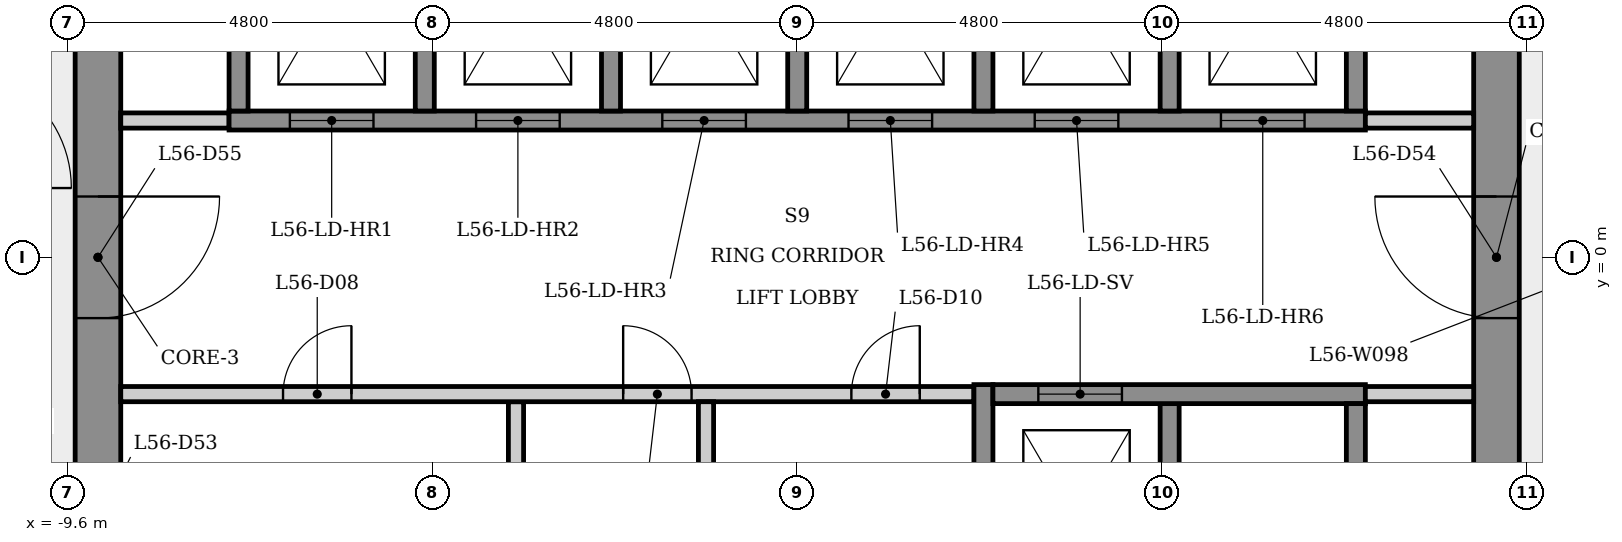
"""IFC4 building model, lengths in metres.
Left out: names, types, materials, properties, quantities, classifications, styles, units other than length and angle.
Written with IfcOpenShell. Run it as: python <this file> out.ifc"""

import sys

from ifc_helpers import new_model, si_unit, direction, frame, frame_2d, origin, place, context, subcontext, project, spatial, rectangle, extrude, element, fill, save


model = new_model("IFC4")
c1 = context("Model", 3, precision=1e-05, world=origin(), true_north=direction((0.0, 1.0)))
c2 = subcontext(c1, "Body", "Model", "MODEL_VIEW")
j1 = project(units=[si_unit("LENGTHUNIT", "METRE"), si_unit("PLANEANGLEUNIT", "RADIAN")], contexts=[c1])
p1 = place(None, origin())
s1 = spatial("IfcSite", under=j1, at=p1, CompositionType="ELEMENT")
p2 = place(p1, origin())
s2 = spatial("IfcBuilding", under=s1, at=p2, CompositionType="ELEMENT")
p3 = place(p2, frame((0.0, 0.0, 210.1)))
s3 = spatial("IfcBuildingStorey", under=s2, at=p3, CompositionType="ELEMENT", Elevation=210.1)
p4 = place(p3, frame((9.2, -5.485, 0.0), z_axis=(0.0, 0.0, 1.0), x_axis=(0.0, 1.0, 0.0)))
e1 = element("IfcWall", 1, at=p4, inside=s3, PredefinedType="SHEAR", context=c2, shape_type="SweptSolid", body=[
    extrude(rectangle(XDim=10.97, YDim=0.6, at=frame_2d((5.485, 0.0))), origin(), (0.0, 0.0, 1.0), 4.0),
])
p5 = place(p4, frame((4.685, 0.0, 0.0)))
e2 = element("IfcOpeningElement", 2, at=p5, cuts=e1, PredefinedType="OPENING", context=c2, shape_type="SweptSolid", body=[
    extrude(rectangle(XDim=1.6, YDim=2.1, at=frame_2d((0.8, 1.05))), frame((0.0, 0.31, 0.0), z_axis=(0.0, -1.0, 0.0), x_axis=(1.0, 0.0, 0.0)), (0.0, 0.0, 1.0), 0.62),
])
p6 = place(p3, frame((-9.2, 5.485, 0.0), z_axis=(0.0, 0.0, 1.0), x_axis=(0.0, -1.0, 0.0)))
e3 = element("IfcWall", 3, at=p6, inside=s3, PredefinedType="SHEAR", context=c2, shape_type="SweptSolid", body=[
    extrude(rectangle(XDim=10.97, YDim=0.6, at=frame_2d((5.485, 0.0))), origin(), (0.0, 0.0, 1.0), 4.0),
])
p7 = place(p6, frame((8.516, 0.0, 0.0)))
e4 = element("IfcOpeningElement", 4, at=p7, cuts=e3, PredefinedType="OPENING", context=c2, shape_type="SweptSolid", body=[
    extrude(rectangle(XDim=0.9, YDim=2.1, at=frame_2d((0.45, 1.05))), frame((0.0, 0.31, 0.0), z_axis=(0.0, -1.0, 0.0), x_axis=(1.0, 0.0, 0.0)), (0.0, 0.0, 1.0), 0.62),
])
p8 = place(p6, frame((4.685, 0.0, 0.0)))
e5 = element("IfcOpeningElement", 5, at=p8, cuts=e3, PredefinedType="OPENING", context=c2, shape_type="SweptSolid", body=[
    extrude(rectangle(XDim=1.6, YDim=2.1, at=frame_2d((0.8, 1.05))), frame((0.0, 0.31, 0.0), z_axis=(0.0, -1.0, 0.0), x_axis=(1.0, 0.0, 0.0)), (0.0, 0.0, 1.0), 0.62),
])
p9 = place(p3, frame((-8.9, 1.8, 0.0), z_axis=(0.0, 0.0, 1.0), x_axis=(1.0, 0.0, 0.0)))
e6 = element("IfcWall", 6, at=p9, inside=s3, PredefinedType="PARTITIONING", context=c2, shape_type="SweptSolid", body=[
    extrude(rectangle(XDim=1.425, YDim=0.2, at=frame_2d((0.712, 0.0))), origin(), (0.0, 0.0, 1.0), 3.6),
])
p10 = place(p3, frame((-7.475, 1.8, 0.0), z_axis=(0.0, 0.0, 1.0), x_axis=(1.0, 0.0, 0.0)))
e7 = element("IfcWall", 7, at=p10, inside=s3, PredefinedType="SHEAR", context=c2, shape_type="SweptSolid", body=[
    extrude(rectangle(XDim=14.95, YDim=0.25, at=frame_2d((7.475, 0.0))), origin(), (0.0, 0.0, 1.0), 3.6),
])
p11 = place(p10, frame((0.8, 0.0, 0.0)))
e8 = element("IfcOpeningElement", 8, at=p11, cuts=e7, PredefinedType="OPENING", context=c2, shape_type="SweptSolid", body=[
    extrude(rectangle(XDim=1.1, YDim=2.1, at=frame_2d((0.55, 1.05))), frame((0.0, 0.135, 0.0), z_axis=(0.0, -1.0, 0.0), x_axis=(1.0, 0.0, 0.0)), (0.0, 0.0, 1.0), 0.27),
])
p12 = place(p10, frame((3.25, 0.0, 0.0)))
e9 = element("IfcOpeningElement", 9, at=p12, cuts=e7, PredefinedType="OPENING", context=c2, shape_type="SweptSolid", body=[
    extrude(rectangle(XDim=1.1, YDim=2.1, at=frame_2d((0.55, 1.05))), frame((0.0, 0.135, 0.0), z_axis=(0.0, -1.0, 0.0), x_axis=(1.0, 0.0, 0.0)), (0.0, 0.0, 1.0), 0.27),
])
p13 = place(p10, frame((5.7, 0.0, 0.0)))
e10 = element("IfcOpeningElement", 10, at=p13, cuts=e7, PredefinedType="OPENING", context=c2, shape_type="SweptSolid", body=[
    extrude(rectangle(XDim=1.1, YDim=2.1, at=frame_2d((0.55, 1.05))), frame((0.0, 0.135, 0.0), z_axis=(0.0, -1.0, 0.0), x_axis=(1.0, 0.0, 0.0)), (0.0, 0.0, 1.0), 0.27),
])
p14 = place(p10, frame((8.15, 0.0, 0.0)))
e11 = element("IfcOpeningElement", 11, at=p14, cuts=e7, PredefinedType="OPENING", context=c2, shape_type="SweptSolid", body=[
    extrude(rectangle(XDim=1.1, YDim=2.1, at=frame_2d((0.55, 1.05))), frame((0.0, 0.135, 0.0), z_axis=(0.0, -1.0, 0.0), x_axis=(1.0, 0.0, 0.0)), (0.0, 0.0, 1.0), 0.27),
])
p15 = place(p10, frame((10.6, 0.0, 0.0)))
e12 = element("IfcOpeningElement", 12, at=p15, cuts=e7, PredefinedType="OPENING", context=c2, shape_type="SweptSolid", body=[
    extrude(rectangle(XDim=1.1, YDim=2.1, at=frame_2d((0.55, 1.05))), frame((0.0, 0.135, 0.0), z_axis=(0.0, -1.0, 0.0), x_axis=(1.0, 0.0, 0.0)), (0.0, 0.0, 1.0), 0.27),
])
p16 = place(p10, frame((13.05, 0.0, 0.0)))
e13 = element("IfcOpeningElement", 13, at=p16, cuts=e7, PredefinedType="OPENING", context=c2, shape_type="SweptSolid", body=[
    extrude(rectangle(XDim=1.1, YDim=2.1, at=frame_2d((0.55, 1.05))), frame((0.0, 0.135, 0.0), z_axis=(0.0, -1.0, 0.0), x_axis=(1.0, 0.0, 0.0)), (0.0, 0.0, 1.0), 0.27),
])
p17 = place(p3, frame((-7.35, 1.925, 0.0), z_axis=(0.0, 0.0, 1.0), x_axis=(0.0, 1.0, 0.0)))
e14 = element("IfcWall", 14, at=p17, inside=s3, PredefinedType="SHEAR", context=c2, shape_type="SweptSolid", body=[
    extrude(rectangle(XDim=4.036, YDim=0.25, at=frame_2d((2.018, 0.0))), origin(), (0.0, 0.0, 1.0), 3.6),
])
p18 = place(p3, frame((-4.9, 5.025, 0.0), z_axis=(0.0, 0.0, 1.0), x_axis=(0.0, -1.0, 0.0)))
e15 = element("IfcWall", 15, at=p18, inside=s3, PredefinedType="SHEAR", context=c2, shape_type="SweptSolid", body=[
    extrude(rectangle(XDim=3.1, YDim=0.25, at=frame_2d((1.55, 0.0))), origin(), (0.0, 0.0, 1.0), 4.0),
])
p19 = place(p3, frame((-3.7, -1.9, 0.0), z_axis=(0.0, 0.0, 1.0), x_axis=(0.0, -1.0, 0.0)))
e16 = element("IfcWall", 16, at=p19, inside=s3, PredefinedType="PARTITIONING", context=c2, shape_type="SweptSolid", body=[
    extrude(rectangle(XDim=3.15, YDim=0.2, at=frame_2d((1.575, 0.0))), origin(), (0.0, 0.0, 1.0), 3.6),
])
p20 = place(p3, frame((-8.9, -1.8, 0.0), z_axis=(0.0, 0.0, 1.0), x_axis=(1.0, 0.0, 0.0)))
e17 = element("IfcWall", 17, at=p20, inside=s3, PredefinedType="PARTITIONING", context=c2, shape_type="SweptSolid", body=[
    extrude(rectangle(XDim=11.225, YDim=0.2, at=frame_2d((5.613, 0.0))), origin(), (0.0, 0.0, 1.0), 3.6),
])
p21 = place(p20, frame((2.135, 0.0, 0.0)))
e18 = element("IfcOpeningElement", 18, at=p21, cuts=e17, PredefinedType="OPENING", context=c2, shape_type="SweptSolid", body=[
    extrude(rectangle(XDim=0.9, YDim=2.1, at=frame_2d((0.45, 1.05))), frame((0.0, 0.11, 0.0), z_axis=(0.0, -1.0, 0.0), x_axis=(1.0, 0.0, 0.0)), (0.0, 0.0, 1.0), 0.22),
])
p22 = place(p20, frame((6.61, 0.0, 0.0)))
e19 = element("IfcOpeningElement", 19, at=p22, cuts=e17, PredefinedType="OPENING", context=c2, shape_type="SweptSolid", body=[
    extrude(rectangle(XDim=0.9, YDim=2.1, at=frame_2d((0.45, 1.05))), frame((0.0, 0.11, 0.0), z_axis=(0.0, -1.0, 0.0), x_axis=(1.0, 0.0, 0.0)), (0.0, 0.0, 1.0), 0.22),
])
p23 = place(p20, frame((9.613, 0.0, 0.0)))
e20 = element("IfcOpeningElement", 20, at=p23, cuts=e17, PredefinedType="OPENING", context=c2, shape_type="SweptSolid", body=[
    extrude(rectangle(XDim=0.9, YDim=2.1, at=frame_2d((0.45, 1.05))), frame((0.0, 0.11, 0.0), z_axis=(0.0, -1.0, 0.0), x_axis=(1.0, 0.0, 0.0)), (0.0, 0.0, 1.0), 0.22),
])
p24 = place(p3, frame((-2.45, 5.025, 0.0), z_axis=(0.0, 0.0, 1.0), x_axis=(0.0, -1.0, 0.0)))
e21 = element("IfcWall", 21, at=p24, inside=s3, PredefinedType="SHEAR", context=c2, shape_type="SweptSolid", body=[
    extrude(rectangle(XDim=3.1, YDim=0.25, at=frame_2d((1.55, 0.0))), origin(), (0.0, 0.0, 1.0), 4.0),
])
p25 = place(p3, frame((-1.2, -1.9, 0.0), z_axis=(0.0, 0.0, 1.0), x_axis=(0.0, -1.0, 0.0)))
e22 = element("IfcWall", 22, at=p25, inside=s3, PredefinedType="PARTITIONING", context=c2, shape_type="SweptSolid", body=[
    extrude(rectangle(XDim=3.15, YDim=0.2, at=frame_2d((1.575, 0.0))), origin(), (0.0, 0.0, 1.0), 3.6),
])
p26 = place(p3, frame((0.0, 5.025, 0.0), z_axis=(0.0, 0.0, 1.0), x_axis=(0.0, -1.0, 0.0)))
e23 = element("IfcWall", 23, at=p26, inside=s3, PredefinedType="SHEAR", context=c2, shape_type="SweptSolid", body=[
    extrude(rectangle(XDim=3.1, YDim=0.25, at=frame_2d((1.55, 0.0))), origin(), (0.0, 0.0, 1.0), 4.0),
])
p27 = place(p3, frame((2.45, -5.275, 0.0), z_axis=(0.0, 0.0, 1.0), x_axis=(0.0, 1.0, 0.0)))
e24 = element("IfcWall", 24, at=p27, inside=s3, PredefinedType="SHEAR", context=c2, shape_type="SweptSolid", body=[
    extrude(rectangle(XDim=3.6, YDim=0.25, at=frame_2d((1.8, 0.0))), origin(), (0.0, 0.0, 1.0), 3.6),
])
for number, where, z_axis, x_axis in (
    (25, (2.45, 5.025, 0.0), (0.0, 0.0, 1.0), (0.0, -1.0, 0.0)),
    (26, (4.9, -1.925, 0.0), (0.0, 0.0, 1.0), (0.0, -1.0, 0.0)),
    (27, (4.9, 5.025, 0.0), (0.0, 0.0, 1.0), (0.0, -1.0, 0.0)),
):
    element("IfcWall", number, at=place(p3, frame(where, z_axis=z_axis, x_axis=x_axis)), inside=s3, PredefinedType="SHEAR", context=c2, shape_type="SweptSolid", body=[
        extrude(rectangle(XDim=3.1, YDim=0.25, at=frame_2d((1.55, 0.0))), origin(), (0.0, 0.0, 1.0), 4.0),
    ])
p28 = place(p3, frame((2.575, -1.8, 0.0), z_axis=(0.0, 0.0, 1.0), x_axis=(1.0, 0.0, 0.0)))
e28 = element("IfcWall", 28, at=p28, inside=s3, PredefinedType="SHEAR", context=c2, shape_type="SweptSolid", body=[
    extrude(rectangle(XDim=4.9, YDim=0.25, at=frame_2d((2.45, 0.0))), origin(), (0.0, 0.0, 1.0), 3.6),
])
p29 = place(p28, frame((0.597, 0.0, 0.0)))
e29 = element("IfcOpeningElement", 29, at=p29, cuts=e28, PredefinedType="OPENING", context=c2, shape_type="SweptSolid", body=[
    extrude(rectangle(XDim=1.1, YDim=2.1, at=frame_2d((0.55, 1.05))), frame((0.0, 0.135, 0.0), z_axis=(0.0, -1.0, 0.0), x_axis=(1.0, 0.0, 0.0)), (0.0, 0.0, 1.0), 0.27),
])
p30 = place(p3, frame((7.475, 1.8, 0.0), z_axis=(0.0, 0.0, 1.0), x_axis=(1.0, 0.0, 0.0)))
e30 = element("IfcWall", 30, at=p30, inside=s3, PredefinedType="PARTITIONING", context=c2, shape_type="SweptSolid", body=[
    extrude(rectangle(XDim=1.425, YDim=0.2, at=frame_2d((0.712, 0.0))), origin(), (0.0, 0.0, 1.0), 3.6),
])
for number, where, z_axis, x_axis in (
    (31, (7.35, -1.925, 0.0), (0.0, 0.0, 1.0), (0.0, -1.0, 0.0)),
    (32, (7.35, 5.025, 0.0), (0.0, 0.0, 1.0), (0.0, -1.0, 0.0)),
):
    element("IfcWall", number, at=place(p3, frame(where, z_axis=z_axis, x_axis=x_axis)), inside=s3, PredefinedType="SHEAR", context=c2, shape_type="SweptSolid", body=[
        extrude(rectangle(XDim=3.1, YDim=0.25, at=frame_2d((1.55, 0.0))), origin(), (0.0, 0.0, 1.0), 4.0),
    ])
p31 = place(p3, frame((8.9, -1.8, 0.0), z_axis=(0.0, 0.0, 1.0), x_axis=(-1.0, 0.0, 0.0)))
e33 = element("IfcWall", 33, at=p31, inside=s3, PredefinedType="PARTITIONING", context=c2, shape_type="SweptSolid", body=[
    extrude(rectangle(XDim=1.425, YDim=0.2, at=frame_2d((0.712, 0.0))), origin(), (0.0, 0.0, 1.0), 3.6),
])
p32 = place(p11, origin())
e34 = element("IfcDoor", 34, at=p32, inside=s3, OperationType="SLIDING_TO_LEFT", PredefinedType="DOOR", context=c2, shape_type="SweptSolid", body=[
    extrude(rectangle(XDim=1.1, YDim=2.1, at=frame_2d((0.55, 1.05))), frame((0.0, 0.025, 0.0), z_axis=(0.0, -1.0, 0.0), x_axis=(1.0, 0.0, 0.0)), (0.0, 0.0, 1.0), 0.05),
])
fill(e8, e34)
p33 = place(p12, origin())
e35 = element("IfcDoor", 35, at=p33, inside=s3, OperationType="SLIDING_TO_LEFT", PredefinedType="DOOR", context=c2, shape_type="SweptSolid", body=[
    extrude(rectangle(XDim=1.1, YDim=2.1, at=frame_2d((0.55, 1.05))), frame((0.0, 0.025, 0.0), z_axis=(0.0, -1.0, 0.0), x_axis=(1.0, 0.0, 0.0)), (0.0, 0.0, 1.0), 0.05),
])
fill(e9, e35)
p34 = place(p13, origin())
e36 = element("IfcDoor", 36, at=p34, inside=s3, OperationType="SLIDING_TO_LEFT", PredefinedType="DOOR", context=c2, shape_type="SweptSolid", body=[
    extrude(rectangle(XDim=1.1, YDim=2.1, at=frame_2d((0.55, 1.05))), frame((0.0, 0.025, 0.0), z_axis=(0.0, -1.0, 0.0), x_axis=(1.0, 0.0, 0.0)), (0.0, 0.0, 1.0), 0.05),
])
fill(e10, e36)
p35 = place(p14, origin())
e37 = element("IfcDoor", 37, at=p35, inside=s3, OperationType="SLIDING_TO_LEFT", PredefinedType="DOOR", context=c2, shape_type="SweptSolid", body=[
    extrude(rectangle(XDim=1.1, YDim=2.1, at=frame_2d((0.55, 1.05))), frame((0.0, 0.025, 0.0), z_axis=(0.0, -1.0, 0.0), x_axis=(1.0, 0.0, 0.0)), (0.0, 0.0, 1.0), 0.05),
])
fill(e11, e37)
p36 = place(p15, origin())
e38 = element("IfcDoor", 38, at=p36, inside=s3, OperationType="SLIDING_TO_LEFT", PredefinedType="DOOR", context=c2, shape_type="SweptSolid", body=[
    extrude(rectangle(XDim=1.1, YDim=2.1, at=frame_2d((0.55, 1.05))), frame((0.0, 0.025, 0.0), z_axis=(0.0, -1.0, 0.0), x_axis=(1.0, 0.0, 0.0)), (0.0, 0.0, 1.0), 0.05),
])
fill(e12, e38)
p37 = place(p16, origin())
e39 = element("IfcDoor", 39, at=p37, inside=s3, OperationType="SLIDING_TO_LEFT", PredefinedType="DOOR", context=c2, shape_type="SweptSolid", body=[
    extrude(rectangle(XDim=1.1, YDim=2.1, at=frame_2d((0.55, 1.05))), frame((0.0, 0.025, 0.0), z_axis=(0.0, -1.0, 0.0), x_axis=(1.0, 0.0, 0.0)), (0.0, 0.0, 1.0), 0.05),
])
fill(e13, e39)
p38 = place(p29, origin())
e40 = element("IfcDoor", 40, at=p38, inside=s3, OperationType="SLIDING_TO_LEFT", PredefinedType="DOOR", context=c2, shape_type="SweptSolid", body=[
    extrude(rectangle(XDim=1.1, YDim=2.1, at=frame_2d((0.55, 1.05))), frame((0.0, 0.025, 0.0), z_axis=(0.0, -1.0, 0.0), x_axis=(1.0, 0.0, 0.0)), (0.0, 0.0, 1.0), 0.05),
])
fill(e29, e40)
p39 = place(p21, origin())
e41 = element("IfcDoor", 41, at=p39, inside=s3, OperationType="SINGLE_SWING_RIGHT", PredefinedType="DOOR", context=c2, shape_type="SweptSolid", body=[
    extrude(rectangle(XDim=0.9, YDim=2.1, at=frame_2d((0.45, 1.05))), frame((0.0, 0.025, 0.0), z_axis=(0.0, -1.0, 0.0), x_axis=(1.0, 0.0, 0.0)), (0.0, 0.0, 1.0), 0.05),
])
fill(e18, e41)
p40 = place(p22, origin())
e42 = element("IfcDoor", 42, at=p40, inside=s3, OperationType="SINGLE_SWING_LEFT", PredefinedType="DOOR", context=c2, shape_type="SweptSolid", body=[
    extrude(rectangle(XDim=0.9, YDim=2.1, at=frame_2d((0.45, 1.05))), frame((0.0, 0.025, 0.0), z_axis=(0.0, -1.0, 0.0), x_axis=(1.0, 0.0, 0.0)), (0.0, 0.0, 1.0), 0.05),
])
fill(e19, e42)
p41 = place(p23, origin())
e43 = element("IfcDoor", 43, at=p41, inside=s3, OperationType="SINGLE_SWING_RIGHT", PredefinedType="DOOR", context=c2, shape_type="SweptSolid", body=[
    extrude(rectangle(XDim=0.9, YDim=2.1, at=frame_2d((0.45, 1.05))), frame((0.0, 0.025, 0.0), z_axis=(0.0, -1.0, 0.0), x_axis=(1.0, 0.0, 0.0)), (0.0, 0.0, 1.0), 0.05),
])
fill(e20, e43)
p42 = place(p5, origin())
e44 = element("IfcDoor", 44, at=p42, inside=s3, OperationType="SINGLE_SWING_RIGHT", PredefinedType="DOOR", context=c2, shape_type="SweptSolid", body=[
    extrude(rectangle(XDim=1.6, YDim=2.1, at=frame_2d((0.8, 1.05))), frame((0.0, 0.025, 0.0), z_axis=(0.0, -1.0, 0.0), x_axis=(1.0, 0.0, 0.0)), (0.0, 0.0, 1.0), 0.05),
])
fill(e2, e44)
p43 = place(p8, origin())
e45 = element("IfcDoor", 45, at=p43, inside=s3, OperationType="SINGLE_SWING_LEFT", PredefinedType="DOOR", context=c2, shape_type="SweptSolid", body=[
    extrude(rectangle(XDim=1.6, YDim=2.1, at=frame_2d((0.8, 1.05))), frame((0.0, 0.025, 0.0), z_axis=(0.0, -1.0, 0.0), x_axis=(1.0, 0.0, 0.0)), (0.0, 0.0, 1.0), 0.05),
])
fill(e5, e45)
save(model, sys.argv[1])
